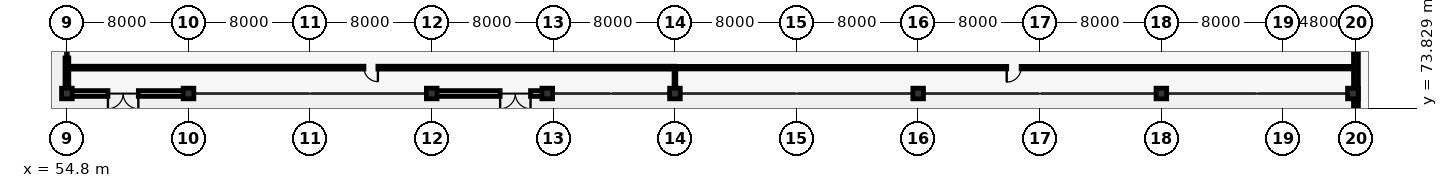
"""IFC4 building model, lengths in metres.
Left out: names, types, materials, properties, quantities, classifications, styles, units other than length and angle.
Written with IfcOpenShell. Run it as: python <this file> out.ifc"""

import sys

from ifc_helpers import new_model, si_unit, direction, frame, frame_2d, origin, origin_2d, place, context, subcontext, project, spatial, rectangle, extrude, element, fill, save


model = new_model("IFC4")
c1 = context("Model", 3, precision=1e-05, world=origin(), true_north=direction((0.0, 1.0)))
c2 = subcontext(c1, "Body", "Model", "MODEL_VIEW")
j1 = project(units=[si_unit("LENGTHUNIT", "METRE"), si_unit("PLANEANGLEUNIT", "RADIAN")], contexts=[c1])
p1 = place(None, origin())
s1 = spatial("IfcSite", under=j1, at=p1, CompositionType="ELEMENT")
p2 = place(p1, origin())
s2 = spatial("IfcBuilding", under=s1, at=p2, CompositionType="ELEMENT")
p3 = place(p2, origin())
s3 = spatial("IfcBuildingStorey", under=s2, at=p3, CompositionType="ELEMENT", Elevation=0.0)
for number, where, z_axis, x_axis in (
    (1, (54.8, 74.8, 0.0), (0.0, 0.0, 1.0), (1.0, 0.0, 0.0)),
    (2, (62.8, 74.8, 0.0), (0.0, 0.0, 1.0), (1.0, 0.0, 0.0)),
    (3, (78.8, 74.8, 0.0), (0.0, 0.0, 1.0), (1.0, 0.0, 0.0)),
    (4, (86.4, 74.8, 0.0), (0.0, 0.0, 1.0), (1.0, 0.0, 0.0)),
    (5, (94.8, 74.8, 0.0), (0.0, 0.0, 1.0), (1.0, 0.0, 0.0)),
    (6, (110.8, 74.8, 0.0), (0.0, 0.0, 1.0), (1.0, 0.0, 0.0)),
    (7, (126.8, 74.8, 0.0), (0.0, 0.0, 1.0), (1.0, 0.0, 0.0)),
    (8, (139.4, 74.8, 0.0), (0.0, 0.0, 1.0), (1.0, 0.0, 0.0)),
):
    element("IfcColumn", number, at=place(p3, frame(where, z_axis=z_axis, x_axis=x_axis)), inside=s3, PredefinedType="COLUMN", context=c2, shape_type="SweptSolid", body=[
        extrude(rectangle(XDim=0.7, YDim=0.7, at=origin_2d()), origin(), (0.0, 0.0, 1.0), 5.4),
    ])
p4 = place(p3, frame((62.8, 74.8, 0.0), z_axis=(0.0, 0.0, 1.0), x_axis=(-1.0, 0.0, 0.0)))
e9 = element("IfcWall", 9, at=p4, inside=s3, PredefinedType="SOLIDWALL", context=c2, shape_type="SweptSolid", body=[
    extrude(rectangle(XDim=8.0, YDim=0.38, at=frame_2d((4.0, 0.0))), origin(), (0.0, 0.0, 1.0), 4.39),
])
p5 = place(p4, frame((3.3, 0.0, 0.0)))
e10 = element("IfcOpeningElement", 10, at=p5, cuts=e9, PredefinedType="OPENING", context=c2, shape_type="SweptSolid", body=[
    extrude(rectangle(XDim=2.0, YDim=2.5, at=frame_2d((1.0, 1.25))), frame((0.0, 0.2, 0.0), z_axis=(0.0, -1.0, 0.0), x_axis=(1.0, 0.0, 0.0)), (0.0, 0.0, 1.0), 0.4),
])
p6 = place(p3, frame((86.4, 74.8, 0.0), z_axis=(0.0, 0.0, 1.0), x_axis=(-1.0, 0.0, 0.0)))
e11 = element("IfcWall", 11, at=p6, inside=s3, PredefinedType="SOLIDWALL", context=c2, shape_type="SweptSolid", body=[
    extrude(rectangle(XDim=7.6, YDim=0.38, at=frame_2d((3.8, 0.0))), origin(), (0.0, 0.0, 1.0), 4.39),
])
p7 = place(p6, frame((1.1, 0.0, 0.0)))
e12 = element("IfcOpeningElement", 12, at=p7, cuts=e11, PredefinedType="OPENING", context=c2, shape_type="SweptSolid", body=[
    extrude(rectangle(XDim=2.0, YDim=2.5, at=frame_2d((1.0, 1.25))), frame((0.0, 0.2, 0.0), z_axis=(0.0, -1.0, 0.0), x_axis=(1.0, 0.0, 0.0)), (0.0, 0.0, 1.0), 0.4),
])
p8 = place(p3, frame((54.8, 74.94, 0.0), z_axis=(0.0, 0.0, 1.0), x_axis=(0.0, 1.0, 0.0)))
e13 = element("IfcWall", 13, at=p8, inside=s3, PredefinedType="SOLIDWALL", context=c2, shape_type="SweptSolid", body=[
    extrude(rectangle(XDim=12.52, YDim=0.25, at=frame_2d((6.26, 0.0))), origin(), (0.0, 0.0, 1.0), 4.29),
])
p9 = place(p8, frame((2.2, 0.0, 0.8)))
e14 = element("IfcOpeningElement", 14, at=p9, cuts=e13, PredefinedType="OPENING", context=c2, shape_type="SweptSolid", body=[
    extrude(rectangle(XDim=1.4, YDim=2.1, at=frame_2d((0.7, 1.05))), frame((0.0, 0.135, 0.0), z_axis=(0.0, -1.0, 0.0), x_axis=(1.0, 0.0, 0.0)), (0.0, 0.0, 1.0), 0.27),
])
p10 = place(p3, frame((139.6, 71.74, 0.0), z_axis=(0.0, 0.0, 1.0), x_axis=(0.0, 1.0, 0.0)))
e15 = element("IfcWall", 15, at=p10, inside=s3, PredefinedType="SOLIDWALL", context=c2, shape_type="SweptSolid", body=[
    extrude(rectangle(XDim=46.12, YDim=0.32, at=frame_2d((23.06, 0.0))), origin(), (0.0, 0.0, 1.0), 4.29),
])
p11 = place(p10, frame((31.38, 0.0, 0.0)))
e16 = element("IfcOpeningElement", 16, at=p11, cuts=e15, PredefinedType="OPENING", context=c2, shape_type="SweptSolid", body=[
    extrude(rectangle(XDim=1.4, YDim=2.25, at=frame_2d((0.7, 1.125))), frame((0.0, 0.17, 0.0), z_axis=(0.0, -1.0, 0.0), x_axis=(1.0, 0.0, 0.0)), (0.0, 0.0, 1.0), 0.34),
])
p12 = place(p3, frame((94.8, 76.5, 0.0), z_axis=(0.0, 0.0, 1.0), x_axis=(-1.0, 0.0, 0.0)))
e17 = element("IfcWall", 17, at=p12, inside=s3, PredefinedType="PARTITIONING", context=c2, shape_type="SweptSolid", body=[
    extrude(rectangle(XDim=40.0, YDim=0.19, at=frame_2d((20.0, 0.0))), origin(), (0.0, 0.0, 1.0), 5.14),
])
p13 = place(p12, frame((19.54, 0.0, 0.0)))
e18 = element("IfcOpeningElement", 18, at=p13, cuts=e17, PredefinedType="OPENING", context=c2, shape_type="SweptSolid", body=[
    extrude(rectangle(XDim=0.92, YDim=2.1, at=frame_2d((0.46, 1.05))), frame((0.0, 0.105, 0.0), z_axis=(0.0, -1.0, 0.0), x_axis=(1.0, 0.0, 0.0)), (0.0, 0.0, 1.0), 0.21),
])
p14 = place(p3, frame((139.4, 76.5, 0.0), z_axis=(0.0, 0.0, 1.0), x_axis=(-1.0, 0.0, 0.0)))
e19 = element("IfcWall", 19, at=p14, inside=s3, PredefinedType="PARTITIONING", context=c2, shape_type="SweptSolid", body=[
    extrude(rectangle(XDim=44.6, YDim=0.165, at=frame_2d((22.3, 0.0))), origin(), (0.0, 0.0, 1.0), 5.14),
])
p15 = place(p14, frame((21.825, 0.0, 0.0)))
e20 = element("IfcOpeningElement", 20, at=p15, cuts=e19, PredefinedType="OPENING", context=c2, shape_type="SweptSolid", body=[
    extrude(rectangle(XDim=0.95, YDim=2.1, at=frame_2d((0.475, 1.05))), frame((0.0, 0.093, 0.0), z_axis=(0.0, -1.0, 0.0), x_axis=(1.0, 0.0, 0.0)), (0.0, 0.0, 1.0), 0.185),
])
p16 = place(p3, frame((94.8, 76.5, 0.0), z_axis=(0.0, 0.0, 1.0), x_axis=(0.0, -1.0, 0.0)))
e21 = element("IfcWall", 21, at=p16, inside=s3, PredefinedType="PARTITIONING", context=c2, shape_type="SweptSolid", body=[
    extrude(rectangle(XDim=1.348, YDim=0.115, at=frame_2d((0.674, 0.0))), origin(), (0.0, 0.0, 1.0), 4.39),
])
p17 = place(p5, origin())
e22 = element("IfcDoor", 22, at=p17, inside=s3, OperationType="DOUBLE_SWING_LEFT", PredefinedType="DOOR", context=c2, shape_type="SweptSolid", body=[
    extrude(rectangle(XDim=2.0, YDim=2.5, at=frame_2d((1.0, 1.25))), frame((0.0, 0.025, 0.0), z_axis=(0.0, -1.0, 0.0), x_axis=(1.0, 0.0, 0.0)), (0.0, 0.0, 1.0), 0.05),
])
fill(e10, e22)
p18 = place(p7, origin())
e23 = element("IfcDoor", 23, at=p18, inside=s3, OperationType="DOUBLE_SWING_LEFT", PredefinedType="DOOR", context=c2, shape_type="SweptSolid", body=[
    extrude(rectangle(XDim=2.0, YDim=2.5, at=frame_2d((1.0, 1.25))), frame((0.0, 0.025, 0.0), z_axis=(0.0, -1.0, 0.0), x_axis=(1.0, 0.0, 0.0)), (0.0, 0.0, 1.0), 0.05),
])
fill(e12, e23)
p19 = place(p9, origin())
e24 = element("IfcWindow", 24, at=p19, inside=s3, PartitioningType="SINGLE_PANEL", PredefinedType="WINDOW", context=c2, shape_type="SweptSolid", body=[
    extrude(rectangle(XDim=1.4, YDim=2.1, at=frame_2d((0.7, 1.05))), frame((0.0, 0.03, 0.0), z_axis=(0.0, -1.0, 0.0), x_axis=(1.0, 0.0, 0.0)), (0.0, 0.0, 1.0), 0.06),
])
fill(e14, e24)
p20 = place(p13, origin())
e25 = element("IfcDoor", 25, at=p20, inside=s3, OperationType="SINGLE_SWING_LEFT", PredefinedType="DOOR", context=c2, shape_type="SweptSolid", body=[
    extrude(rectangle(XDim=0.92, YDim=2.1, at=frame_2d((0.46, 1.05))), frame((0.0, 0.025, 0.0), z_axis=(0.0, -1.0, 0.0), x_axis=(1.0, 0.0, 0.0)), (0.0, 0.0, 1.0), 0.05),
])
fill(e18, e25)
p21 = place(p15, origin())
e26 = element("IfcDoor", 26, at=p21, inside=s3, OperationType="SINGLE_SWING_RIGHT", PredefinedType="DOOR", context=c2, shape_type="SweptSolid", body=[
    extrude(rectangle(XDim=0.95, YDim=2.1, at=frame_2d((0.475, 1.05))), frame((0.0, 0.025, 0.0), z_axis=(0.0, -1.0, 0.0), x_axis=(1.0, 0.0, 0.0)), (0.0, 0.0, 1.0), 0.05),
])
fill(e20, e26)
save(model, sys.argv[1])
